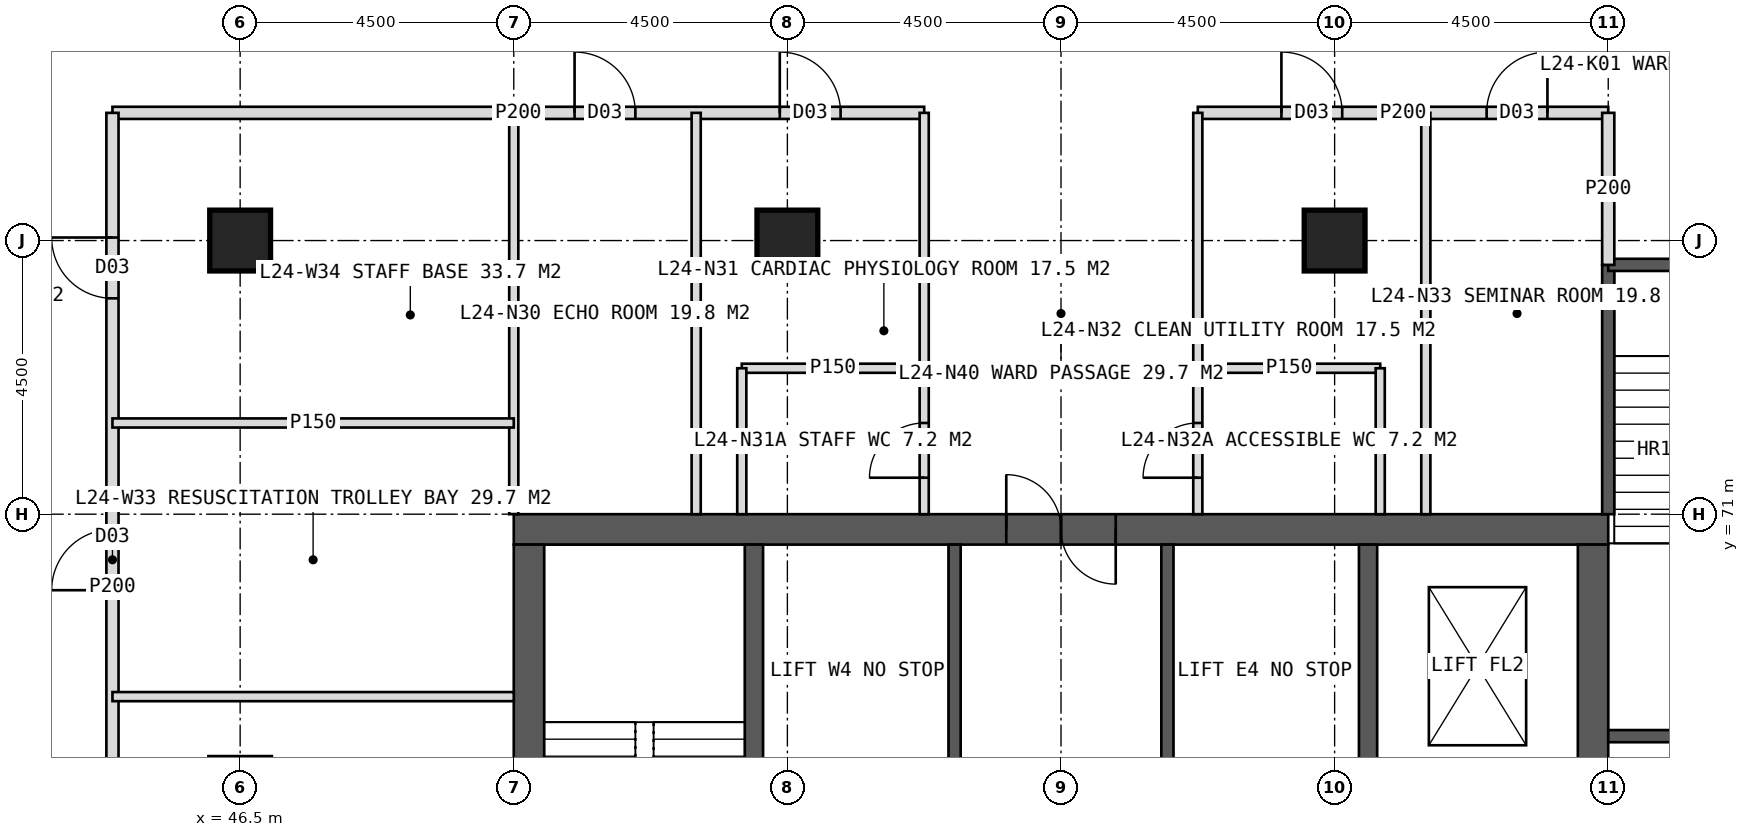
"""IFC4 building model, lengths in metres.
Left out: names, types, materials, properties, quantities, classifications, styles, units other than length and angle.
Written with IfcOpenShell. Run it as: python <this file> out.ifc"""

import sys

from ifc_helpers import new_model, si_unit, direction, frame, frame_2d, origin, origin_2d, place, context, subcontext, project, spatial, rectangle, hollow_rectangle, extrude, element, fill, save


model = new_model("IFC4")
c1 = context("Model", 3, precision=1e-05, world=origin(), true_north=direction((0.0, 1.0)))
c2 = subcontext(c1, "Body", "Model", "MODEL_VIEW")
j1 = project(units=[si_unit("LENGTHUNIT", "METRE"), si_unit("PLANEANGLEUNIT", "RADIAN")], contexts=[c1])
p1 = place(None, origin())
s1 = spatial("IfcSite", under=j1, at=p1, CompositionType="ELEMENT")
p2 = place(p1, origin())
s2 = spatial("IfcBuilding", under=s1, at=p2, CompositionType="ELEMENT")
p3 = place(p2, frame((0.0, 0.0, 104.0)))
s3 = spatial("IfcBuildingStorey", under=s2, at=p3, CompositionType="ELEMENT", Elevation=104.0)
p4 = place(p3, frame((51.0, 70.75, 0.0), z_axis=(0.0, 0.0, 1.0), x_axis=(1.0, 0.0, 0.0)))
e1 = element("IfcWall", 1, at=p4, inside=s3, PredefinedType="SHEAR", context=c2, shape_type="SweptSolid", body=[
    extrude(rectangle(XDim=18.0, YDim=0.5, at=frame_2d((9.0, 0.0))), origin(), (0.0, 0.0, 1.0), 4.0),
])
p5 = place(p4, frame((8.1, 0.0, 0.0)))
e2 = element("IfcOpeningElement", 2, at=p5, cuts=e1, PredefinedType="OPENING", context=c2, shape_type="SweptSolid", body=[
    extrude(rectangle(XDim=1.8, YDim=2.2, at=frame_2d((0.9, 1.1))), frame((0.0, 0.26, 0.0), z_axis=(0.0, -1.0, 0.0), x_axis=(1.0, 0.0, 0.0)), (0.0, 0.0, 1.0), 0.52),
])
p6 = place(p3, frame((51.25, 53.5, 0.0), z_axis=(0.0, 0.0, 1.0), x_axis=(0.0, 1.0, 0.0)))
e3 = element("IfcWall", 3, at=p6, inside=s3, PredefinedType="SHEAR", context=c2, shape_type="SweptSolid", body=[
    extrude(rectangle(XDim=17.0, YDim=0.5, at=frame_2d((8.5, 0.0))), origin(), (0.0, 0.0, 1.0), 4.0),
])
p7 = place(p6, frame((6.0, 0.0, 0.0)))
e4 = element("IfcOpeningElement", 4, at=p7, cuts=e3, PredefinedType="OPENING", context=c2, shape_type="SweptSolid", body=[
    extrude(rectangle(XDim=1.5, YDim=2.2, at=frame_2d((0.75, 1.1))), frame((0.0, 0.26, 0.0), z_axis=(0.0, -1.0, 0.0), x_axis=(1.0, 0.0, 0.0)), (0.0, 0.0, 1.0), 0.52),
])
p8 = place(p3, frame((68.75, 53.5, 0.0), z_axis=(0.0, 0.0, 1.0), x_axis=(0.0, 1.0, 0.0)))
e5 = element("IfcWall", 5, at=p8, inside=s3, PredefinedType="SHEAR", context=c2, shape_type="SweptSolid", body=[
    extrude(rectangle(XDim=17.0, YDim=0.5, at=frame_2d((8.5, 0.0))), origin(), (0.0, 0.0, 1.0), 4.0),
])
p9 = place(p8, frame((9.5, 0.0, 0.0)))
e6 = element("IfcOpeningElement", 6, at=p9, cuts=e5, PredefinedType="OPENING", context=c2, shape_type="SweptSolid", body=[
    extrude(rectangle(XDim=1.5, YDim=2.2, at=frame_2d((0.75, 1.1))), frame((0.0, 0.26, 0.0), z_axis=(0.0, -1.0, 0.0), x_axis=(1.0, 0.0, 0.0)), (0.0, 0.0, 1.0), 0.52),
])
for number, where, z_axis, x_axis in (
    (7, (54.95, 53.5, 0.0), (0.0, 0.0, 1.0), (0.0, 1.0, 0.0)),
    (8, (65.05, 53.5, 0.0), (0.0, 0.0, 1.0), (0.0, 1.0, 0.0)),
):
    element("IfcWall", number, at=place(p3, frame(where, z_axis=z_axis, x_axis=x_axis)), inside=s3, PredefinedType="SHEAR", context=c2, shape_type="SweptSolid", body=[
        extrude(rectangle(XDim=17.0, YDim=0.3, at=frame_2d((8.5, 0.0))), origin(), (0.0, 0.0, 1.0), 4.0),
    ])
p10 = place(p3, frame((58.25, 53.5, 0.0), z_axis=(0.0, 0.0, 1.0), x_axis=(0.0, 1.0, 0.0)))
e9 = element("IfcWall", 9, at=p10, inside=s3, PredefinedType="SHEAR", context=c2, shape_type="SweptSolid", body=[
    extrude(rectangle(XDim=17.0, YDim=0.2, at=frame_2d((8.5, 0.0))), origin(), (0.0, 0.0, 1.0), 4.0),
])
p11 = place(p10, frame((1.375, 0.0, 0.0)))
e10 = element("IfcOpeningElement", 10, at=p11, cuts=e9, PredefinedType="OPENING", context=c2, shape_type="SweptSolid", body=[
    extrude(rectangle(XDim=1.4, YDim=2.2, at=frame_2d((0.7, 1.1))), frame((0.0, 0.11, 0.0), z_axis=(0.0, -1.0, 0.0), x_axis=(1.0, 0.0, 0.0)), (0.0, 0.0, 1.0), 0.22),
])
p12 = place(p10, frame((5.675, 0.0, 0.0)))
e11 = element("IfcOpeningElement", 11, at=p12, cuts=e9, PredefinedType="OPENING", context=c2, shape_type="SweptSolid", body=[
    extrude(rectangle(XDim=1.4, YDim=2.2, at=frame_2d((0.7, 1.1))), frame((0.0, 0.11, 0.0), z_axis=(0.0, -1.0, 0.0), x_axis=(1.0, 0.0, 0.0)), (0.0, 0.0, 1.0), 0.22),
])
p13 = place(p3, frame((61.75, 53.5, 0.0), z_axis=(0.0, 0.0, 1.0), x_axis=(0.0, 1.0, 0.0)))
e12 = element("IfcWall", 12, at=p13, inside=s3, PredefinedType="SHEAR", context=c2, shape_type="SweptSolid", body=[
    extrude(rectangle(XDim=17.0, YDim=0.2, at=frame_2d((8.5, 0.0))), origin(), (0.0, 0.0, 1.0), 4.0),
])
p14 = place(p13, frame((1.375, 0.0, 0.0)))
e13 = element("IfcOpeningElement", 13, at=p14, cuts=e12, PredefinedType="OPENING", context=c2, shape_type="SweptSolid", body=[
    extrude(rectangle(XDim=1.4, YDim=2.2, at=frame_2d((0.7, 1.1))), frame((0.0, 0.11, 0.0), z_axis=(0.0, -1.0, 0.0), x_axis=(1.0, 0.0, 0.0)), (0.0, 0.0, 1.0), 0.22),
])
p15 = place(p13, frame((5.675, 0.0, 0.0)))
e14 = element("IfcOpeningElement", 14, at=p15, cuts=e12, PredefinedType="OPENING", context=c2, shape_type="SweptSolid", body=[
    extrude(rectangle(XDim=1.4, YDim=2.2, at=frame_2d((0.7, 1.1))), frame((0.0, 0.11, 0.0), z_axis=(0.0, -1.0, 0.0), x_axis=(1.0, 0.0, 0.0)), (0.0, 0.0, 1.0), 0.22),
])
for number, where, z_axis, x_axis in (
    (15, (46.5, 75.5, 0.0), (0.0, 0.0, 1.0), (1.0, 0.0, 0.0)),
    (16, (55.5, 75.5, 0.0), (0.0, 0.0, 1.0), (1.0, 0.0, 0.0)),
    (17, (64.5, 75.5, 0.0), (0.0, 0.0, 1.0), (1.0, 0.0, 0.0)),
):
    element("IfcColumn", number, at=place(p3, frame(where, z_axis=z_axis, x_axis=x_axis)), inside=s3, PredefinedType="COLUMN", context=c2, shape_type="SweptSolid", body=[
        extrude(hollow_rectangle(XDim=1.0, YDim=1.0, WallThickness=0.1, at=origin_2d()), origin(), (0.0, 0.0, 1.0), 4.0),
    ])
p16 = place(p3, frame((51.0, 71.0, 0.0), z_axis=(0.0, 0.0, 1.0), x_axis=(0.0, 1.0, 0.0)))
e18 = element("IfcWall", 18, at=p16, inside=s3, PredefinedType="PARTITIONING", context=c2, shape_type="SweptSolid", body=[
    extrude(rectangle(XDim=6.6, YDim=0.15, at=frame_2d((3.3, 0.0))), origin(), (0.0, 0.0, 1.0), 3.75),
])
p17 = place(p3, frame((44.4, 77.6, 0.0), z_axis=(0.0, 0.0, 1.0), x_axis=(1.0, 0.0, 0.0)))
e19 = element("IfcWall", 19, at=p17, inside=s3, PredefinedType="PARTITIONING", context=c2, shape_type="SweptSolid", body=[
    extrude(rectangle(XDim=13.35, YDim=0.2, at=frame_2d((6.675, 0.0))), origin(), (0.0, 0.0, 1.0), 3.75),
])
p18 = place(p17, frame((7.6, 0.0, 0.0)))
e20 = element("IfcOpeningElement", 20, at=p18, cuts=e19, PredefinedType="OPENING", context=c2, shape_type="SweptSolid", body=[
    extrude(rectangle(XDim=1.0, YDim=2.1, at=frame_2d((0.5, 1.05))), frame((0.0, 0.11, 0.0), z_axis=(0.0, -1.0, 0.0), x_axis=(1.0, 0.0, 0.0)), (0.0, 0.0, 1.0), 0.22),
])
p19 = place(p17, frame((10.975, 0.0, 0.0)))
e21 = element("IfcOpeningElement", 21, at=p19, cuts=e19, PredefinedType="OPENING", context=c2, shape_type="SweptSolid", body=[
    extrude(rectangle(XDim=1.0, YDim=2.1, at=frame_2d((0.5, 1.05))), frame((0.0, 0.11, 0.0), z_axis=(0.0, -1.0, 0.0), x_axis=(1.0, 0.0, 0.0)), (0.0, 0.0, 1.0), 0.22),
])
p20 = place(p3, frame((62.25, 77.6, 0.0), z_axis=(0.0, 0.0, 1.0), x_axis=(1.0, 0.0, 0.0)))
e22 = element("IfcWall", 22, at=p20, inside=s3, PredefinedType="PARTITIONING", context=c2, shape_type="SweptSolid", body=[
    extrude(rectangle(XDim=6.75, YDim=0.2, at=frame_2d((3.375, 0.0))), origin(), (0.0, 0.0, 1.0), 3.75),
])
p21 = place(p20, frame((1.375, 0.0, 0.0)))
e23 = element("IfcOpeningElement", 23, at=p21, cuts=e22, PredefinedType="OPENING", context=c2, shape_type="SweptSolid", body=[
    extrude(rectangle(XDim=1.0, YDim=2.1, at=frame_2d((0.5, 1.05))), frame((0.0, 0.11, 0.0), z_axis=(0.0, -1.0, 0.0), x_axis=(1.0, 0.0, 0.0)), (0.0, 0.0, 1.0), 0.22),
])
p22 = place(p20, frame((4.75, 0.0, 0.0)))
e24 = element("IfcOpeningElement", 24, at=p22, cuts=e22, PredefinedType="OPENING", context=c2, shape_type="SweptSolid", body=[
    extrude(rectangle(XDim=1.0, YDim=2.1, at=frame_2d((0.5, 1.05))), frame((0.0, 0.11, 0.0), z_axis=(0.0, -1.0, 0.0), x_axis=(1.0, 0.0, 0.0)), (0.0, 0.0, 1.0), 0.22),
])
p23 = place(p3, frame((57.75, 71.0, 0.0), z_axis=(0.0, 0.0, 1.0), x_axis=(0.0, 1.0, 0.0)))
e25 = element("IfcWall", 25, at=p23, inside=s3, PredefinedType="PARTITIONING", context=c2, shape_type="SweptSolid", body=[
    extrude(rectangle(XDim=6.6, YDim=0.15, at=frame_2d((3.3, 0.0))), origin(), (0.0, 0.0, 1.0), 3.75),
])
p24 = place(p23, frame((0.6, 0.0, 0.0)))
e26 = element("IfcOpeningElement", 26, at=p24, cuts=e25, PredefinedType="OPENING", context=c2, shape_type="SweptSolid", body=[
    extrude(rectangle(XDim=0.9, YDim=2.1, at=frame_2d((0.45, 1.05))), frame((0.0, 0.085, 0.0), z_axis=(0.0, -1.0, 0.0), x_axis=(1.0, 0.0, 0.0)), (0.0, 0.0, 1.0), 0.17),
])
p25 = place(p3, frame((62.25, 71.0, 0.0), z_axis=(0.0, 0.0, 1.0), x_axis=(0.0, 1.0, 0.0)))
e27 = element("IfcWall", 27, at=p25, inside=s3, PredefinedType="PARTITIONING", context=c2, shape_type="SweptSolid", body=[
    extrude(rectangle(XDim=6.6, YDim=0.15, at=frame_2d((3.3, 0.0))), origin(), (0.0, 0.0, 1.0), 3.75),
])
p26 = place(p25, frame((0.6, 0.0, 0.0)))
e28 = element("IfcOpeningElement", 28, at=p26, cuts=e27, PredefinedType="OPENING", context=c2, shape_type="SweptSolid", body=[
    extrude(rectangle(XDim=0.9, YDim=2.1, at=frame_2d((0.45, 1.05))), frame((0.0, 0.085, 0.0), z_axis=(0.0, -1.0, 0.0), x_axis=(1.0, 0.0, 0.0)), (0.0, 0.0, 1.0), 0.17),
])
for number, where, z_axis, x_axis in (
    (29, (54.0, 71.0, 0.0), (0.0, 0.0, 1.0), (0.0, 1.0, 0.0)),
    (30, (66.0, 71.0, 0.0), (0.0, 0.0, 1.0), (0.0, 1.0, 0.0)),
):
    element("IfcWall", number, at=place(p3, frame(where, z_axis=z_axis, x_axis=x_axis)), inside=s3, PredefinedType="PARTITIONING", context=c2, shape_type="SweptSolid", body=[
        extrude(rectangle(XDim=6.6, YDim=0.15, at=frame_2d((3.3, 0.0))), origin(), (0.0, 0.0, 1.0), 3.75),
    ])
p27 = place(p3, frame((54.75, 73.4, 0.0), z_axis=(0.0, 0.0, 1.0), x_axis=(1.0, 0.0, 0.0)))
e31 = element("IfcWall", 31, at=p27, inside=s3, PredefinedType="PARTITIONING", context=c2, shape_type="SweptSolid", body=[
    extrude(rectangle(XDim=3.0, YDim=0.15, at=frame_2d((1.5, 0.0))), origin(), (0.0, 0.0, 1.0), 3.75),
])
p28 = place(p3, frame((54.75, 71.0, 0.0), z_axis=(0.0, 0.0, 1.0), x_axis=(0.0, 1.0, 0.0)))
e32 = element("IfcWall", 32, at=p28, inside=s3, PredefinedType="PARTITIONING", context=c2, shape_type="SweptSolid", body=[
    extrude(rectangle(XDim=2.4, YDim=0.15, at=frame_2d((1.2, 0.0))), origin(), (0.0, 0.0, 1.0), 3.75),
])
p29 = place(p3, frame((62.25, 73.4, 0.0), z_axis=(0.0, 0.0, 1.0), x_axis=(1.0, 0.0, 0.0)))
e33 = element("IfcWall", 33, at=p29, inside=s3, PredefinedType="PARTITIONING", context=c2, shape_type="SweptSolid", body=[
    extrude(rectangle(XDim=3.0, YDim=0.15, at=frame_2d((1.5, 0.0))), origin(), (0.0, 0.0, 1.0), 3.75),
])
p30 = place(p3, frame((65.25, 71.0, 0.0), z_axis=(0.0, 0.0, 1.0), x_axis=(0.0, 1.0, 0.0)))
e34 = element("IfcWall", 34, at=p30, inside=s3, PredefinedType="PARTITIONING", context=c2, shape_type="SweptSolid", body=[
    extrude(rectangle(XDim=2.4, YDim=0.15, at=frame_2d((1.2, 0.0))), origin(), (0.0, 0.0, 1.0), 3.75),
])
p31 = place(p3, frame((44.4, 62.0, 0.0), z_axis=(0.0, 0.0, 1.0), x_axis=(0.0, 1.0, 0.0)))
e35 = element("IfcWall", 35, at=p31, inside=s3, PredefinedType="PARTITIONING", context=c2, shape_type="SweptSolid", body=[
    extrude(rectangle(XDim=15.6, YDim=0.2, at=frame_2d((7.8, 0.0))), origin(), (0.0, 0.0, 1.0), 3.75),
])
p32 = place(p31, frame((2.5, 0.0, 0.0)))
e36 = element("IfcOpeningElement", 36, at=p32, cuts=e35, PredefinedType="OPENING", context=c2, shape_type="SweptSolid", body=[
    extrude(rectangle(XDim=1.0, YDim=2.1, at=frame_2d((0.5, 1.05))), frame((0.0, 0.11, 0.0), z_axis=(0.0, -1.0, 0.0), x_axis=(1.0, 0.0, 0.0)), (0.0, 0.0, 1.0), 0.22),
])
p33 = place(p31, frame((7.75, 0.0, 0.0)))
e37 = element("IfcOpeningElement", 37, at=p33, cuts=e35, PredefinedType="OPENING", context=c2, shape_type="SweptSolid", body=[
    extrude(rectangle(XDim=1.0, YDim=2.1, at=frame_2d((0.5, 1.05))), frame((0.0, 0.11, 0.0), z_axis=(0.0, -1.0, 0.0), x_axis=(1.0, 0.0, 0.0)), (0.0, 0.0, 1.0), 0.22),
])
p34 = place(p31, frame((12.55, 0.0, 0.0)))
e38 = element("IfcOpeningElement", 38, at=p34, cuts=e35, PredefinedType="OPENING", context=c2, shape_type="SweptSolid", body=[
    extrude(rectangle(XDim=1.0, YDim=2.1, at=frame_2d((0.5, 1.05))), frame((0.0, 0.11, 0.0), z_axis=(0.0, -1.0, 0.0), x_axis=(1.0, 0.0, 0.0)), (0.0, 0.0, 1.0), 0.22),
])
for number, where, z_axis, x_axis in (
    (39, (51.0, 68.0, 0.0), (0.0, 0.0, 1.0), (-1.0, 0.0, 0.0)),
    (40, (51.0, 72.5, 0.0), (0.0, 0.0, 1.0), (-1.0, 0.0, 0.0)),
):
    element("IfcWall", number, at=place(p3, frame(where, z_axis=z_axis, x_axis=x_axis)), inside=s3, PredefinedType="PARTITIONING", context=c2, shape_type="SweptSolid", body=[
        extrude(rectangle(XDim=6.6, YDim=0.15, at=frame_2d((3.3, 0.0))), origin(), (0.0, 0.0, 1.0), 3.75),
    ])
p35 = place(p3, frame((69.0, 71.0, 0.0), z_axis=(0.0, 0.0, 1.0), x_axis=(0.0, 1.0, 0.0)))
e41 = element("IfcWall", 41, at=p35, inside=s3, PredefinedType="SOLIDWALL", context=c2, shape_type="SweptSolid", body=[
    extrude(rectangle(XDim=4.1, YDim=0.2, at=frame_2d((2.05, 0.0))), origin(), (0.0, 0.0, 1.0), 3.75),
])
p36 = place(p3, frame((69.0, 67.35, 0.0), z_axis=(0.0, 0.0, 1.0), x_axis=(1.0, 0.0, 0.0)))
e42 = element("IfcWall", 42, at=p36, inside=s3, PredefinedType="SOLIDWALL", context=c2, shape_type="SweptSolid", body=[
    extrude(rectangle(XDim=3.5, YDim=0.2, at=frame_2d((1.75, 0.0))), origin(), (0.0, 0.0, 1.0), 3.75),
])
p37 = place(p3, frame((69.0, 75.1, 0.0), z_axis=(0.0, 0.0, 1.0), x_axis=(1.0, 0.0, 0.0)))
e43 = element("IfcWall", 43, at=p37, inside=s3, PredefinedType="SOLIDWALL", context=c2, shape_type="SweptSolid", body=[
    extrude(rectangle(XDim=3.5, YDim=0.2, at=frame_2d((1.75, 0.0))), origin(), (0.0, 0.0, 1.0), 3.75),
])
p38 = place(p37, frame((1.15, 0.0, 0.0)))
e44 = element("IfcOpeningElement", 44, at=p38, cuts=e43, PredefinedType="OPENING", context=c2, shape_type="SweptSolid", body=[
    extrude(rectangle(XDim=1.2, YDim=2.1, at=frame_2d((0.6, 1.05))), frame((0.0, 0.11, 0.0), z_axis=(0.0, -1.0, 0.0), x_axis=(1.0, 0.0, 0.0)), (0.0, 0.0, 1.0), 0.22),
])
p39 = place(p3, frame((69.0, 75.1, 0.0), z_axis=(0.0, 0.0, 1.0), x_axis=(0.0, 1.0, 0.0)))
e45 = element("IfcWall", 45, at=p39, inside=s3, PredefinedType="PARTITIONING", context=c2, shape_type="SweptSolid", body=[
    extrude(rectangle(XDim=2.5, YDim=0.2, at=frame_2d((1.25, 0.0))), origin(), (0.0, 0.0, 1.0), 3.75),
])
p40 = place(p18, origin())
e46 = element("IfcDoor", 46, at=p40, inside=s3, OperationType="SINGLE_SWING_LEFT", PredefinedType="DOOR", context=c2, shape_type="SweptSolid", body=[
    extrude(rectangle(XDim=1.0, YDim=2.1, at=frame_2d((0.5, 1.05))), frame((0.0, 0.025, 0.0), z_axis=(0.0, -1.0, 0.0), x_axis=(1.0, 0.0, 0.0)), (0.0, 0.0, 1.0), 0.05),
])
fill(e20, e46)
p41 = place(p24, origin())
e47 = element("IfcDoor", 47, at=p41, inside=s3, OperationType="SINGLE_SWING_LEFT", PredefinedType="DOOR", context=c2, shape_type="SweptSolid", body=[
    extrude(rectangle(XDim=0.9, YDim=2.1, at=frame_2d((0.45, 1.05))), frame((0.0, 0.025, 0.0), z_axis=(0.0, -1.0, 0.0), x_axis=(1.0, 0.0, 0.0)), (0.0, 0.0, 1.0), 0.05),
])
fill(e26, e47)
p42 = place(p19, origin())
e48 = element("IfcDoor", 48, at=p42, inside=s3, OperationType="SINGLE_SWING_LEFT", PredefinedType="DOOR", context=c2, shape_type="SweptSolid", body=[
    extrude(rectangle(XDim=1.0, YDim=2.1, at=frame_2d((0.5, 1.05))), frame((0.0, 0.025, 0.0), z_axis=(0.0, -1.0, 0.0), x_axis=(1.0, 0.0, 0.0)), (0.0, 0.0, 1.0), 0.05),
])
fill(e21, e48)
p43 = place(p26, origin())
e49 = element("IfcDoor", 49, at=p43, inside=s3, OperationType="SINGLE_SWING_LEFT", PredefinedType="DOOR", context=c2, shape_type="SweptSolid", body=[
    extrude(rectangle(XDim=0.9, YDim=2.1, at=frame_2d((0.45, 1.05))), frame((0.0, 0.025, 0.0), z_axis=(0.0, -1.0, 0.0), x_axis=(1.0, 0.0, 0.0)), (0.0, 0.0, 1.0), 0.05),
])
fill(e28, e49)
p44 = place(p21, origin())
e50 = element("IfcDoor", 50, at=p44, inside=s3, OperationType="SINGLE_SWING_LEFT", PredefinedType="DOOR", context=c2, shape_type="SweptSolid", body=[
    extrude(rectangle(XDim=1.0, YDim=2.1, at=frame_2d((0.5, 1.05))), frame((0.0, 0.025, 0.0), z_axis=(0.0, -1.0, 0.0), x_axis=(1.0, 0.0, 0.0)), (0.0, 0.0, 1.0), 0.05),
])
fill(e23, e50)
p45 = place(p22, origin())
e51 = element("IfcDoor", 51, at=p45, inside=s3, OperationType="SINGLE_SWING_RIGHT", PredefinedType="DOOR", context=c2, shape_type="SweptSolid", body=[
    extrude(rectangle(XDim=1.0, YDim=2.1, at=frame_2d((0.5, 1.05))), frame((0.0, 0.025, 0.0), z_axis=(0.0, -1.0, 0.0), x_axis=(1.0, 0.0, 0.0)), (0.0, 0.0, 1.0), 0.05),
])
fill(e24, e51)
p46 = place(p33, origin())
e52 = element("IfcDoor", 52, at=p46, inside=s3, OperationType="SINGLE_SWING_LEFT", PredefinedType="DOOR", context=c2, shape_type="SweptSolid", body=[
    extrude(rectangle(XDim=1.0, YDim=2.1, at=frame_2d((0.5, 1.05))), frame((0.0, 0.025, 0.0), z_axis=(0.0, -1.0, 0.0), x_axis=(1.0, 0.0, 0.0)), (0.0, 0.0, 1.0), 0.05),
])
fill(e37, e52)
p47 = place(p34, origin())
e53 = element("IfcDoor", 53, at=p47, inside=s3, OperationType="SINGLE_SWING_RIGHT", PredefinedType="DOOR", context=c2, shape_type="SweptSolid", body=[
    extrude(rectangle(XDim=1.0, YDim=2.1, at=frame_2d((0.5, 1.05))), frame((0.0, 0.025, 0.0), z_axis=(0.0, -1.0, 0.0), x_axis=(1.0, 0.0, 0.0)), (0.0, 0.0, 1.0), 0.05),
])
fill(e38, e53)
p48 = place(p5, origin())
e54 = element("IfcDoor", 54, at=p48, inside=s3, OperationType="DOUBLE_DOOR_SINGLE_SWING", PredefinedType="DOOR", context=c2, shape_type="SweptSolid", body=[
    extrude(rectangle(XDim=1.8, YDim=2.2, at=frame_2d((0.9, 1.1))), frame((0.0, 0.025, 0.0), z_axis=(0.0, -1.0, 0.0), x_axis=(1.0, 0.0, 0.0)), (0.0, 0.0, 1.0), 0.05),
])
fill(e2, e54)
save(model, sys.argv[1])
